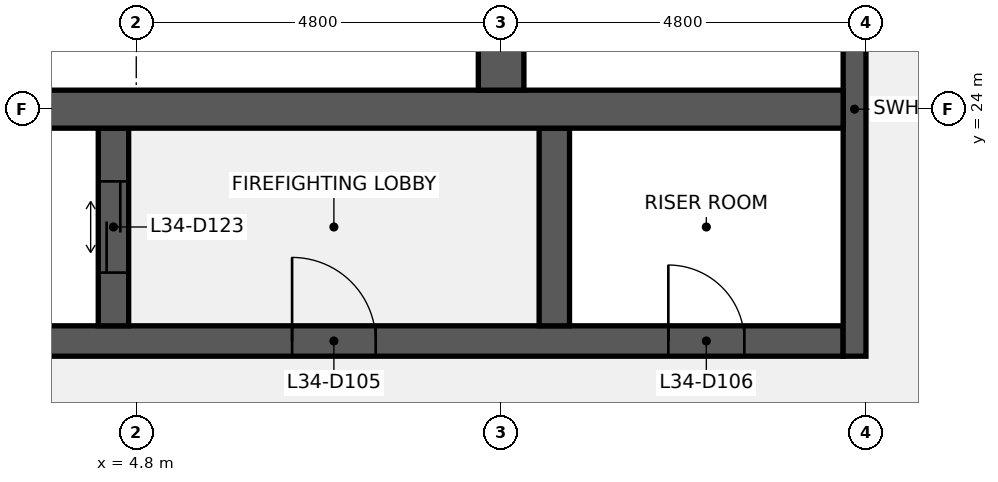
"""IFC4 building model, lengths in metres.
Left out: names, types, materials, properties, quantities, classifications, styles, units other than length and angle.
Written with IfcOpenShell. Run it as: python <this file> out.ifc"""

import sys

from ifc_helpers import new_model, si_unit, direction, frame, frame_2d, origin, place, context, subcontext, project, spatial, rectangle, extrude, element, fill, save


model = new_model("IFC4")
c1 = context("Model", 3, precision=1e-05, world=origin(), true_north=direction((0.0, 1.0)))
c2 = subcontext(c1, "Body", "Model", "MODEL_VIEW")
j1 = project(units=[si_unit("LENGTHUNIT", "METRE"), si_unit("PLANEANGLEUNIT", "RADIAN")], contexts=[c1])
p1 = place(None, origin())
s1 = spatial("IfcSite", under=j1, at=p1, CompositionType="ELEMENT")
p2 = place(p1, origin())
s2 = spatial("IfcBuilding", under=s1, at=p2, CompositionType="ELEMENT")
p3 = place(p2, frame((0.0, 0.0, 156.1)))
s3 = spatial("IfcBuildingStorey", under=s2, at=p3, CompositionType="ELEMENT", Elevation=156.1)
p4 = place(p3, frame((1.0, 20.95, 0.0), z_axis=(0.0, 0.0, 1.0), x_axis=(1.0, 0.0, 0.0)))
e1 = element("IfcWall", 1, at=p4, inside=s3, PredefinedType="SHEAR", context=c2, shape_type="SweptSolid", body=[
    extrude(rectangle(XDim=13.1, YDim=0.4, at=frame_2d((6.55, 0.0))), origin(), (0.0, 0.0, 1.0), 3.84),
])
p5 = place(p4, frame((5.85, 0.0, 0.0)))
e2 = element("IfcOpeningElement", 2, at=p5, cuts=e1, PredefinedType="OPENING", context=c2, shape_type="SweptSolid", body=[
    extrude(rectangle(XDim=1.1, YDim=2.1, at=frame_2d((0.55, 1.05))), frame((0.0, 0.21, 0.0), z_axis=(0.0, -1.0, 0.0), x_axis=(1.0, 0.0, 0.0)), (0.0, 0.0, 1.0), 0.42),
])
p6 = place(p4, frame((10.8, 0.0, 0.0)))
e3 = element("IfcOpeningElement", 3, at=p6, cuts=e1, PredefinedType="OPENING", context=c2, shape_type="SweptSolid", body=[
    extrude(rectangle(XDim=1.0, YDim=2.1, at=frame_2d((0.5, 1.05))), frame((0.0, 0.21, 0.0), z_axis=(0.0, -1.0, 0.0), x_axis=(1.0, 0.0, 0.0)), (0.0, 0.0, 1.0), 0.42),
])
p7 = place(p3, frame((14.25, 20.75, 0.0), z_axis=(0.0, 0.0, 1.0), x_axis=(0.0, 1.0, 0.0)))
e4 = element("IfcWall", 4, at=p7, inside=s3, PredefinedType="SHEAR", context=c2, shape_type="SweptSolid", body=[
    extrude(rectangle(XDim=6.5, YDim=0.3, at=frame_2d((3.25, 0.0))), origin(), (0.0, 0.0, 1.0), 3.84),
])
p8 = place(p3, frame((4.5, 21.15, 0.0), z_axis=(0.0, 0.0, 1.0), x_axis=(0.0, 1.0, 0.0)))
e5 = element("IfcWall", 5, at=p8, inside=s3, PredefinedType="SHEAR", context=c2, shape_type="SweptSolid", body=[
    extrude(rectangle(XDim=2.6, YDim=0.4, at=frame_2d((1.3, 0.0))), origin(), (0.0, 0.0, 1.0), 3.84),
])
p9 = place(p8, frame((0.7, 0.0, 0.0)))
e6 = element("IfcOpeningElement", 6, at=p9, cuts=e5, PredefinedType="OPENING", context=c2, shape_type="SweptSolid", body=[
    extrude(rectangle(XDim=1.2, YDim=2.1, at=frame_2d((0.6, 1.05))), frame((0.0, 0.21, 0.0), z_axis=(0.0, -1.0, 0.0), x_axis=(1.0, 0.0, 0.0)), (0.0, 0.0, 1.0), 0.42),
])
p10 = place(p3, frame((10.3, 21.15, 0.0), z_axis=(0.0, 0.0, 1.0), x_axis=(0.0, 1.0, 0.0)))
e7 = element("IfcWall", 7, at=p10, inside=s3, PredefinedType="SHEAR", context=c2, shape_type="SweptSolid", body=[
    extrude(rectangle(XDim=2.6, YDim=0.4, at=frame_2d((1.3, 0.0))), origin(), (0.0, 0.0, 1.0), 3.84),
])
p11 = place(p3, frame((1.0, 24.0, 0.0), z_axis=(0.0, 0.0, 1.0), x_axis=(1.0, 0.0, 0.0)))
e8 = element("IfcWall", 8, at=p11, inside=s3, PredefinedType="SHEAR", context=c2, shape_type="SweptSolid", body=[
    extrude(rectangle(XDim=13.1, YDim=0.5, at=frame_2d((6.55, 0.0))), origin(), (0.0, 0.0, 1.0), 3.84),
])
p12 = place(p3, frame((9.6, 24.25, 0.0), z_axis=(0.0, 0.0, 1.0), x_axis=(0.0, 1.0, 0.0)))
e9 = element("IfcWall", 9, at=p12, inside=s3, PredefinedType="SHEAR", context=c2, shape_type="SweptSolid", body=[
    extrude(rectangle(XDim=2.6, YDim=0.6, at=frame_2d((1.3, 0.0))), origin(), (0.0, 0.0, 1.0), 3.84),
])
p13 = place(p5, origin())
e10 = element("IfcDoor", 10, at=p13, inside=s3, OperationType="SINGLE_SWING_LEFT", PredefinedType="DOOR", context=c2, shape_type="SweptSolid", body=[
    extrude(rectangle(XDim=1.1, YDim=2.1, at=frame_2d((0.55, 1.05))), frame((0.0, 0.025, 0.0), z_axis=(0.0, -1.0, 0.0), x_axis=(1.0, 0.0, 0.0)), (0.0, 0.0, 1.0), 0.05),
])
fill(e2, e10)
p14 = place(p6, origin())
e11 = element("IfcDoor", 11, at=p14, inside=s3, OperationType="SINGLE_SWING_LEFT", PredefinedType="DOOR", context=c2, shape_type="SweptSolid", body=[
    extrude(rectangle(XDim=1.0, YDim=2.1, at=frame_2d((0.5, 1.05))), frame((0.0, 0.025, 0.0), z_axis=(0.0, -1.0, 0.0), x_axis=(1.0, 0.0, 0.0)), (0.0, 0.0, 1.0), 0.05),
])
fill(e3, e11)
p15 = place(p9, origin())
e12 = element("IfcDoor", 12, at=p15, inside=s3, OperationType="DOUBLE_DOOR_SLIDING", PredefinedType="DOOR", context=c2, shape_type="SweptSolid", body=[
    extrude(rectangle(XDim=1.2, YDim=2.1, at=frame_2d((0.6, 1.05))), frame((0.0, 0.025, 0.0), z_axis=(0.0, -1.0, 0.0), x_axis=(1.0, 0.0, 0.0)), (0.0, 0.0, 1.0), 0.05),
])
fill(e6, e12)
save(model, sys.argv[1])
